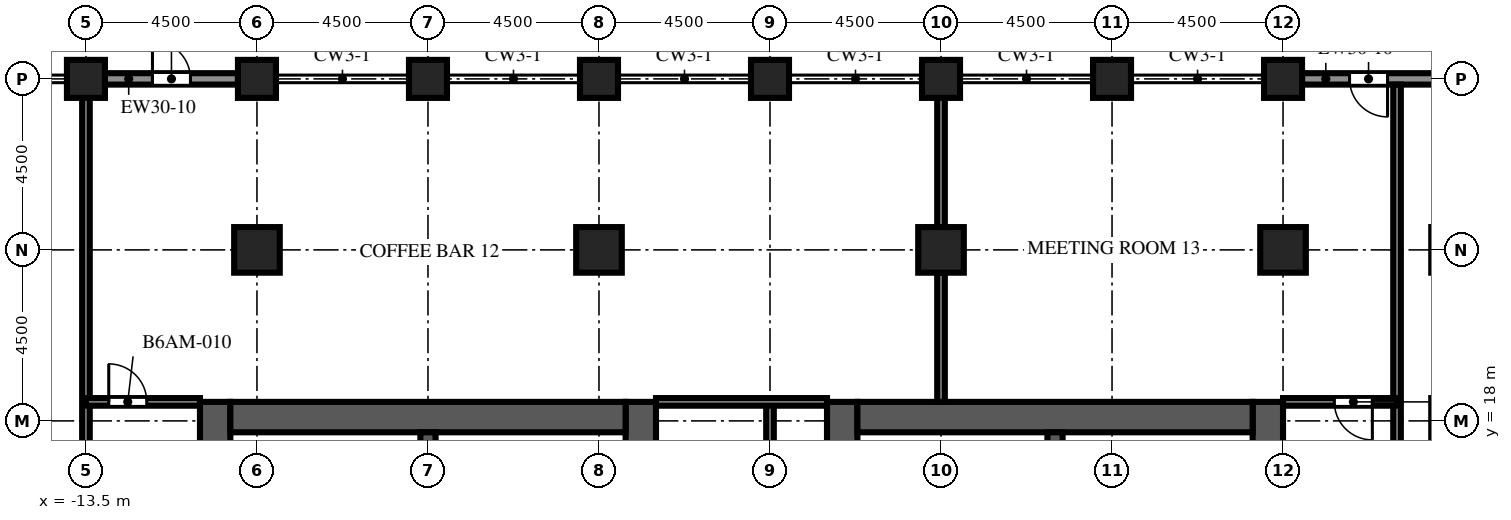
"""IFC4 building model, lengths in metres.
Left out: names, types, materials, properties, quantities, classifications, styles, units other than length and angle.
Written with IfcOpenShell. Run it as: python <this file> out.ifc"""

import sys

from ifc_helpers import new_model, si_unit, direction, frame, frame_2d, origin, origin_2d, place, context, subcontext, project, spatial, rectangle, extrude, element, fill, save


model = new_model("IFC4")
c1 = context("Model", 3, precision=1e-05, world=origin(), true_north=direction((0.0, 1.0)))
c2 = subcontext(c1, "Body", "Model", "MODEL_VIEW")
j1 = project(units=[si_unit("LENGTHUNIT", "METRE"), si_unit("PLANEANGLEUNIT", "RADIAN")], contexts=[c1])
p1 = place(None, origin())
s1 = spatial("IfcSite", under=j1, at=p1, CompositionType="ELEMENT")
p2 = place(p1, origin())
s2 = spatial("IfcBuilding", under=s1, at=p2, CompositionType="ELEMENT")
p3 = place(p2, frame((0.0, 0.0, 220.2)))
s3 = spatial("IfcBuildingStorey", under=s2, at=p3, CompositionType="ELEMENT", Elevation=220.2)
for number, where, z_axis, x_axis in (
    (1, (-13.5, 27.0, 0.0), (0.0, 0.0, 1.0), (1.0, 0.0, 0.0)),
    (2, (-9.0, 27.0, 0.0), (0.0, 0.0, 1.0), (1.0, 0.0, 0.0)),
    (3, (-4.5, 27.0, 0.0), (0.0, 0.0, 1.0), (1.0, 0.0, 0.0)),
    (4, (0.0, 27.0, 0.0), (0.0, 0.0, 1.0), (1.0, 0.0, 0.0)),
    (5, (4.5, 27.0, 0.0), (0.0, 0.0, 1.0), (1.0, 0.0, 0.0)),
    (6, (9.0, 27.0, 0.0), (0.0, 0.0, 1.0), (1.0, 0.0, 0.0)),
    (7, (13.5, 27.0, 0.0), (0.0, 0.0, 1.0), (1.0, 0.0, 0.0)),
    (8, (18.0, 27.0, 0.0), (0.0, 0.0, 1.0), (1.0, 0.0, 0.0)),
):
    element("IfcColumn", number, at=place(p3, frame(where, z_axis=z_axis, x_axis=x_axis)), inside=s3, PredefinedType="COLUMN", context=c2, shape_type="SweptSolid", body=[
        extrude(rectangle(XDim=1.0, YDim=1.0, at=origin_2d()), origin(), (0.0, 0.0, 1.0), 6.0),
    ])
for number, where, z_axis, x_axis in (
    (9, (-9.0, 22.5, 0.0), (0.0, 0.0, 1.0), (1.0, 0.0, 0.0)),
    (10, (0.0, 22.5, 0.0), (0.0, 0.0, 1.0), (1.0, 0.0, 0.0)),
    (11, (9.0, 22.5, 0.0), (0.0, 0.0, 1.0), (1.0, 0.0, 0.0)),
    (12, (18.0, 22.5, 0.0), (0.0, 0.0, 1.0), (1.0, 0.0, 0.0)),
):
    element("IfcColumn", number, at=place(p3, frame(where, z_axis=z_axis, x_axis=x_axis)), inside=s3, PredefinedType="COLUMN", context=c2, shape_type="SweptSolid", body=[
        extrude(rectangle(XDim=1.2, YDim=1.2, at=origin_2d()), origin(), (0.0, 0.0, 1.0), 6.0),
    ])
p4 = place(p3, frame((-10.1, -9.0, 0.0), z_axis=(0.0, 0.0, 1.0), x_axis=(0.0, 1.0, 0.0)))
e13 = element("IfcWall", 13, at=p4, inside=s3, PredefinedType="SHEAR", context=c2, shape_type="SweptSolid", body=[
    extrude(rectangle(XDim=27.5, YDim=0.8, at=frame_2d((13.75, 0.0))), origin(), (0.0, 0.0, 1.0), 6.0),
])
p5 = place(p4, frame((12.55, 0.0, 0.0)))
e14 = element("IfcOpeningElement", 14, at=p5, cuts=e13, PredefinedType="OPENING", context=c2, shape_type="SweptSolid", body=[
    extrude(rectangle(XDim=2.4, YDim=2.4, at=frame_2d((1.2, 1.2))), frame((0.0, 0.41, 0.0), z_axis=(0.0, -1.0, 0.0), x_axis=(1.0, 0.0, 0.0)), (0.0, 0.0, 1.0), 0.82),
])
p6 = place(p4, frame((6.825, 0.0, 0.0)))
e15 = element("IfcOpeningElement", 15, at=p6, cuts=e13, PredefinedType="OPENING", context=c2, shape_type="SweptSolid", body=[
    extrude(rectangle(XDim=1.2, YDim=2.1, at=frame_2d((0.6, 1.05))), frame((0.0, 0.41, 0.0), z_axis=(0.0, -1.0, 0.0), x_axis=(1.0, 0.0, 0.0)), (0.0, 0.0, 1.0), 0.82),
])
p7 = place(p4, frame((19.475, 0.0, 0.0)))
e16 = element("IfcOpeningElement", 16, at=p7, cuts=e13, PredefinedType="OPENING", context=c2, shape_type="SweptSolid", body=[
    extrude(rectangle(XDim=1.2, YDim=2.1, at=frame_2d((0.6, 1.05))), frame((0.0, 0.41, 0.0), z_axis=(0.0, -1.0, 0.0), x_axis=(1.0, 0.0, 0.0)), (0.0, 0.0, 1.0), 0.82),
])
p8 = place(p3, frame((1.1, -9.0, 0.0), z_axis=(0.0, 0.0, 1.0), x_axis=(0.0, 1.0, 0.0)))
e17 = element("IfcWall", 17, at=p8, inside=s3, PredefinedType="SHEAR", context=c2, shape_type="SweptSolid", body=[
    extrude(rectangle(XDim=27.5, YDim=0.8, at=frame_2d((13.75, 0.0))), origin(), (0.0, 0.0, 1.0), 6.0),
])
p9 = place(p8, frame((12.55, 0.0, 0.0)))
e18 = element("IfcOpeningElement", 18, at=p9, cuts=e17, PredefinedType="OPENING", context=c2, shape_type="SweptSolid", body=[
    extrude(rectangle(XDim=2.4, YDim=2.4, at=frame_2d((1.2, 1.2))), frame((0.0, 0.41, 0.0), z_axis=(0.0, -1.0, 0.0), x_axis=(1.0, 0.0, 0.0)), (0.0, 0.0, 1.0), 0.82),
])
p10 = place(p8, frame((5.5, 0.0, 0.0)))
e19 = element("IfcOpeningElement", 19, at=p10, cuts=e17, PredefinedType="OPENING", context=c2, shape_type="SweptSolid", body=[
    extrude(rectangle(XDim=0.95, YDim=2.1, at=frame_2d((0.475, 1.05))), frame((0.0, 0.41, 0.0), z_axis=(0.0, -1.0, 0.0), x_axis=(1.0, 0.0, 0.0)), (0.0, 0.0, 1.0), 0.82),
])
p11 = place(p8, frame((23.475, 0.0, 0.0)))
e20 = element("IfcOpeningElement", 20, at=p11, cuts=e17, PredefinedType="OPENING", context=c2, shape_type="SweptSolid", body=[
    extrude(rectangle(XDim=1.2, YDim=2.1, at=frame_2d((0.6, 1.05))), frame((0.0, 0.41, 0.0), z_axis=(0.0, -1.0, 0.0), x_axis=(1.0, 0.0, 0.0)), (0.0, 0.0, 1.0), 0.82),
])
p12 = place(p3, frame((-9.7, 18.1, 0.0), z_axis=(0.0, 0.0, 1.0), x_axis=(1.0, 0.0, 0.0)))
e21 = element("IfcWall", 21, at=p12, inside=s3, PredefinedType="SHEAR", context=c2, shape_type="SweptSolid", body=[
    extrude(rectangle(XDim=10.4, YDim=0.8, at=frame_2d((5.2, 0.0))), origin(), (0.0, 0.0, 1.0), 6.0),
])
p13 = place(p3, frame((-4.5, 10.2, 0.0), z_axis=(0.0, 0.0, 1.0), x_axis=(0.0, 1.0, 0.0)))
e22 = element("IfcWall", 22, at=p13, inside=s3, PredefinedType="SHEAR", context=c2, shape_type="SweptSolid", body=[
    extrude(rectangle(XDim=7.5, YDim=0.4, at=frame_2d((3.75, 0.0))), origin(), (0.0, 0.0, 1.0), 6.0),
])
p14 = place(p3, frame((6.4, -9.0, 0.0), z_axis=(0.0, 0.0, 1.0), x_axis=(0.0, 1.0, 0.0)))
e23 = element("IfcWall", 23, at=p14, inside=s3, PredefinedType="SHEAR", context=c2, shape_type="SweptSolid", body=[
    extrude(rectangle(XDim=27.5, YDim=0.8, at=frame_2d((13.75, 0.0))), origin(), (0.0, 0.0, 1.0), 6.0),
])
p15 = place(p14, frame((12.55, 0.0, 0.0)))
e24 = element("IfcOpeningElement", 24, at=p15, cuts=e23, PredefinedType="OPENING", context=c2, shape_type="SweptSolid", body=[
    extrude(rectangle(XDim=2.4, YDim=2.4, at=frame_2d((1.2, 1.2))), frame((0.0, 0.41, 0.0), z_axis=(0.0, -1.0, 0.0), x_axis=(1.0, 0.0, 0.0)), (0.0, 0.0, 1.0), 0.82),
])
p16 = place(p14, frame((5.5, 0.0, 0.0)))
e25 = element("IfcOpeningElement", 25, at=p16, cuts=e23, PredefinedType="OPENING", context=c2, shape_type="SweptSolid", body=[
    extrude(rectangle(XDim=0.95, YDim=2.1, at=frame_2d((0.475, 1.05))), frame((0.0, 0.41, 0.0), z_axis=(0.0, -1.0, 0.0), x_axis=(1.0, 0.0, 0.0)), (0.0, 0.0, 1.0), 0.82),
])
p17 = place(p14, frame((23.475, 0.0, 0.0)))
e26 = element("IfcOpeningElement", 26, at=p17, cuts=e23, PredefinedType="OPENING", context=c2, shape_type="SweptSolid", body=[
    extrude(rectangle(XDim=1.2, YDim=2.1, at=frame_2d((0.6, 1.05))), frame((0.0, 0.41, 0.0), z_axis=(0.0, -1.0, 0.0), x_axis=(1.0, 0.0, 0.0)), (0.0, 0.0, 1.0), 0.82),
])
p18 = place(p3, frame((17.6, -9.0, 0.0), z_axis=(0.0, 0.0, 1.0), x_axis=(0.0, 1.0, 0.0)))
e27 = element("IfcWall", 27, at=p18, inside=s3, PredefinedType="SHEAR", context=c2, shape_type="SweptSolid", body=[
    extrude(rectangle(XDim=27.5, YDim=0.8, at=frame_2d((13.75, 0.0))), origin(), (0.0, 0.0, 1.0), 6.0),
])
p19 = place(p18, frame((12.55, 0.0, 0.0)))
e28 = element("IfcOpeningElement", 28, at=p19, cuts=e27, PredefinedType="OPENING", context=c2, shape_type="SweptSolid", body=[
    extrude(rectangle(XDim=2.4, YDim=2.4, at=frame_2d((1.2, 1.2))), frame((0.0, 0.41, 0.0), z_axis=(0.0, -1.0, 0.0), x_axis=(1.0, 0.0, 0.0)), (0.0, 0.0, 1.0), 0.82),
])
p20 = place(p18, frame((6.825, 0.0, 0.0)))
e29 = element("IfcOpeningElement", 29, at=p20, cuts=e27, PredefinedType="OPENING", context=c2, shape_type="SweptSolid", body=[
    extrude(rectangle(XDim=1.2, YDim=2.1, at=frame_2d((0.6, 1.05))), frame((0.0, 0.41, 0.0), z_axis=(0.0, -1.0, 0.0), x_axis=(1.0, 0.0, 0.0)), (0.0, 0.0, 1.0), 0.82),
])
p21 = place(p18, frame((19.475, 0.0, 0.0)))
e30 = element("IfcOpeningElement", 30, at=p21, cuts=e27, PredefinedType="OPENING", context=c2, shape_type="SweptSolid", body=[
    extrude(rectangle(XDim=1.2, YDim=2.1, at=frame_2d((0.6, 1.05))), frame((0.0, 0.41, 0.0), z_axis=(0.0, -1.0, 0.0), x_axis=(1.0, 0.0, 0.0)), (0.0, 0.0, 1.0), 0.82),
])
p22 = place(p3, frame((6.8, 18.1, 0.0), z_axis=(0.0, 0.0, 1.0), x_axis=(1.0, 0.0, 0.0)))
e31 = element("IfcWall", 31, at=p22, inside=s3, PredefinedType="SHEAR", context=c2, shape_type="SweptSolid", body=[
    extrude(rectangle(XDim=10.4, YDim=0.8, at=frame_2d((5.2, 0.0))), origin(), (0.0, 0.0, 1.0), 6.0),
])
p23 = place(p3, frame((12.0, 10.2, 0.0), z_axis=(0.0, 0.0, 1.0), x_axis=(0.0, 1.0, 0.0)))
e32 = element("IfcWall", 32, at=p23, inside=s3, PredefinedType="SHEAR", context=c2, shape_type="SweptSolid", body=[
    extrude(rectangle(XDim=7.5, YDim=0.4, at=frame_2d((3.75, 0.0))), origin(), (0.0, 0.0, 1.0), 6.0),
])
p24 = place(p3, frame((18.5, 27.0, 0.0), z_axis=(0.0, 0.0, 1.0), x_axis=(1.0, 0.0, 0.0)))
e33 = element("IfcWall", 33, at=p24, inside=s3, PredefinedType="SOLIDWALL", context=c2, shape_type="SweptSolid", body=[
    extrude(rectangle(XDim=3.5, YDim=0.3, at=frame_2d((1.75, 0.0))), origin(), (0.0, 0.0, 1.0), 4.6),
])
p25 = place(p24, frame((1.25, 0.0, 0.0)))
e34 = element("IfcOpeningElement", 34, at=p25, cuts=e33, PredefinedType="OPENING", context=c2, shape_type="SweptSolid", body=[
    extrude(rectangle(XDim=1.0, YDim=2.2, at=frame_2d((0.5, 1.1))), frame((0.0, 0.16, 0.0), z_axis=(0.0, -1.0, 0.0), x_axis=(1.0, 0.0, 0.0)), (0.0, 0.0, 1.0), 0.32),
])
p26 = place(p3, frame((-13.0, 27.0, 0.0), z_axis=(0.0, 0.0, 1.0), x_axis=(1.0, 0.0, 0.0)))
e35 = element("IfcWall", 35, at=p26, inside=s3, PredefinedType="SOLIDWALL", context=c2, shape_type="SweptSolid", body=[
    extrude(rectangle(XDim=3.5, YDim=0.3, at=frame_2d((1.75, 0.0))), origin(), (0.0, 0.0, 1.0), 4.6),
])
p27 = place(p26, frame((1.25, 0.0, 0.0)))
e36 = element("IfcOpeningElement", 36, at=p27, cuts=e35, PredefinedType="OPENING", context=c2, shape_type="SweptSolid", body=[
    extrude(rectangle(XDim=1.0, YDim=2.2, at=frame_2d((0.5, 1.1))), frame((0.0, 0.16, 0.0), z_axis=(0.0, -1.0, 0.0), x_axis=(1.0, 0.0, 0.0)), (0.0, 0.0, 1.0), 0.32),
])
p28 = place(p3, frame((-0.6, 15.075, 0.0), z_axis=(0.0, 0.0, 1.0), x_axis=(0.0, 1.0, 0.0)))
e37 = element("IfcWall", 37, at=p28, inside=s3, PredefinedType="PARTITIONING", context=c2, shape_type="SweptSolid", body=[
    extrude(rectangle(XDim=2.625, YDim=0.1, at=frame_2d((1.312, 0.0))), origin(), (0.0, 0.0, 1.0), 5.4),
])
p29 = place(p28, frame((0.812, 0.0, 0.0)))
e38 = element("IfcOpeningElement", 38, at=p29, cuts=e37, PredefinedType="OPENING", context=c2, shape_type="SweptSolid", body=[
    extrude(rectangle(XDim=1.0, YDim=2.1, at=frame_2d((0.5, 1.05))), frame((0.0, 0.06, 0.0), z_axis=(0.0, -1.0, 0.0), x_axis=(1.0, 0.0, 0.0)), (0.0, 0.0, 1.0), 0.12),
])
p30 = place(p3, frame((8.1, 15.075, 0.0), z_axis=(0.0, 0.0, 1.0), x_axis=(0.0, 1.0, 0.0)))
e39 = element("IfcWall", 39, at=p30, inside=s3, PredefinedType="PARTITIONING", context=c2, shape_type="SweptSolid", body=[
    extrude(rectangle(XDim=2.625, YDim=0.1, at=frame_2d((1.312, 0.0))), origin(), (0.0, 0.0, 1.0), 5.4),
])
p31 = place(p30, frame((0.812, 0.0, 0.0)))
e40 = element("IfcOpeningElement", 40, at=p31, cuts=e39, PredefinedType="OPENING", context=c2, shape_type="SweptSolid", body=[
    extrude(rectangle(XDim=1.0, YDim=2.1, at=frame_2d((0.5, 1.05))), frame((0.0, 0.06, 0.0), z_axis=(0.0, -1.0, 0.0), x_axis=(1.0, 0.0, 0.0)), (0.0, 0.0, 1.0), 0.12),
])
p32 = place(p3, frame((-13.5, 6.25, 0.0), z_axis=(0.0, 0.0, 1.0), x_axis=(0.0, 1.0, 0.0)))
e41 = element("IfcWall", 41, at=p32, inside=s3, PredefinedType="PARTITIONING", context=c2, shape_type="SweptSolid", body=[
    extrude(rectangle(XDim=20.25, YDim=0.2, at=frame_2d((10.125, 0.0))), origin(), (0.0, 0.0, 1.0), 5.4),
])
p33 = place(p32, frame((6.1, 0.0, 0.0)))
e42 = element("IfcOpeningElement", 42, at=p33, cuts=e41, PredefinedType="OPENING", context=c2, shape_type="SweptSolid", body=[
    extrude(rectangle(XDim=1.0, YDim=2.1, at=frame_2d((0.5, 1.05))), frame((0.0, 0.11, 0.0), z_axis=(0.0, -1.0, 0.0), x_axis=(1.0, 0.0, 0.0)), (0.0, 0.0, 1.0), 0.22),
])
p34 = place(p3, frame((4.5, 18.5, 0.0), z_axis=(0.0, 0.0, 1.0), x_axis=(0.0, -1.0, 0.0)))
e43 = element("IfcWall", 43, at=p34, inside=s3, PredefinedType="PARTITIONING", context=c2, shape_type="SweptSolid", body=[
    extrude(rectangle(XDim=11.8, YDim=0.2, at=frame_2d((5.9, 0.0))), origin(), (0.0, 0.0, 1.0), 5.4),
])
p35 = place(p34, frame((5.95, 0.0, 0.0)))
e44 = element("IfcOpeningElement", 44, at=p35, cuts=e43, PredefinedType="OPENING", context=c2, shape_type="SweptSolid", body=[
    extrude(rectangle(XDim=1.0, YDim=2.1, at=frame_2d((0.5, 1.05))), frame((0.0, 0.11, 0.0), z_axis=(0.0, -1.0, 0.0), x_axis=(1.0, 0.0, 0.0)), (0.0, 0.0, 1.0), 0.22),
])
for number, where, z_axis, x_axis in (
    (45, (9.0, 18.5, 0.0), (0.0, 0.0, 1.0), (0.0, 1.0, 0.0)),
    (46, (9.0, 23.1, 0.0), (0.0, 0.0, 1.0), (0.0, 1.0, 0.0)),
):
    element("IfcWall", number, at=place(p3, frame(where, z_axis=z_axis, x_axis=x_axis)), inside=s3, PredefinedType="PARTITIONING", context=c2, shape_type="SweptSolid", body=[
        extrude(rectangle(XDim=3.4, YDim=0.2, at=frame_2d((1.7, 0.0))), origin(), (0.0, 0.0, 1.0), 5.4),
    ])
p36 = place(p3, frame((21.0, 26.85, 0.0), z_axis=(0.0, 0.0, 1.0), x_axis=(0.0, -1.0, 0.0)))
e47 = element("IfcWall", 47, at=p36, inside=s3, PredefinedType="PARTITIONING", context=c2, shape_type="SweptSolid", body=[
    extrude(rectangle(XDim=20.6, YDim=0.2, at=frame_2d((10.3, 0.0))), origin(), (0.0, 0.0, 1.0), 5.4),
])
p37 = place(p36, frame((13.25, 0.0, 0.0)))
e48 = element("IfcOpeningElement", 48, at=p37, cuts=e47, PredefinedType="OPENING", context=c2, shape_type="SweptSolid", body=[
    extrude(rectangle(XDim=1.0, YDim=2.1, at=frame_2d((0.5, 1.05))), frame((0.0, 0.11, 0.0), z_axis=(0.0, -1.0, 0.0), x_axis=(1.0, 0.0, 0.0)), (0.0, 0.0, 1.0), 0.22),
])
p38 = place(p3, frame((-13.5, 18.5, 0.0), z_axis=(0.0, 0.0, 1.0), x_axis=(1.0, 0.0, 0.0)))
e49 = element("IfcWall", 49, at=p38, inside=s3, PredefinedType="PARTITIONING", context=c2, shape_type="SweptSolid", body=[
    extrude(rectangle(XDim=3.0, YDim=0.2, at=frame_2d((1.5, 0.0))), origin(), (0.0, 0.0, 1.0), 5.4),
])
p39 = place(p38, frame((0.6, 0.0, 0.0)))
e50 = element("IfcOpeningElement", 50, at=p39, cuts=e49, PredefinedType="OPENING", context=c2, shape_type="SweptSolid", body=[
    extrude(rectangle(XDim=1.0, YDim=2.1, at=frame_2d((0.5, 1.05))), frame((0.0, 0.11, 0.0), z_axis=(0.0, -1.0, 0.0), x_axis=(1.0, 0.0, 0.0)), (0.0, 0.0, 1.0), 0.22),
])
p40 = place(p3, frame((1.5, 18.5, 0.0), z_axis=(0.0, 0.0, 1.0), x_axis=(1.0, 0.0, 0.0)))
e51 = element("IfcWall", 51, at=p40, inside=s3, PredefinedType="PARTITIONING", context=c2, shape_type="SweptSolid", body=[
    extrude(rectangle(XDim=4.5, YDim=0.2, at=frame_2d((2.25, 0.0))), origin(), (0.0, 0.0, 1.0), 5.4),
])
p41 = place(p3, frame((18.0, 18.5, 0.0), z_axis=(0.0, 0.0, 1.0), x_axis=(1.0, 0.0, 0.0)))
e52 = element("IfcWall", 52, at=p41, inside=s3, PredefinedType="PARTITIONING", context=c2, shape_type="SweptSolid", body=[
    extrude(rectangle(XDim=3.0, YDim=0.2, at=frame_2d((1.5, 0.0))), origin(), (0.0, 0.0, 1.0), 5.4),
])
p42 = place(p41, frame((1.35, 0.0, 0.0)))
e53 = element("IfcOpeningElement", 53, at=p42, cuts=e52, PredefinedType="OPENING", context=c2, shape_type="SweptSolid", body=[
    extrude(rectangle(XDim=1.0, YDim=2.1, at=frame_2d((0.5, 1.05))), frame((0.0, 0.11, 0.0), z_axis=(0.0, -1.0, 0.0), x_axis=(1.0, 0.0, 0.0)), (0.0, 0.0, 1.0), 0.22),
])
p43 = place(p25, origin())
e54 = element("IfcDoor", 54, at=p43, inside=s3, OperationType="SINGLE_SWING_RIGHT", PredefinedType="DOOR", context=c2, shape_type="SweptSolid", body=[
    extrude(rectangle(XDim=1.0, YDim=2.2, at=frame_2d((0.5, 1.1))), frame((0.0, 0.025, 0.0), z_axis=(0.0, -1.0, 0.0), x_axis=(1.0, 0.0, 0.0)), (0.0, 0.0, 1.0), 0.05),
])
fill(e34, e54)
p44 = place(p27, origin())
e55 = element("IfcDoor", 55, at=p44, inside=s3, OperationType="SINGLE_SWING_LEFT", PredefinedType="DOOR", context=c2, shape_type="SweptSolid", body=[
    extrude(rectangle(XDim=1.0, YDim=2.2, at=frame_2d((0.5, 1.1))), frame((0.0, 0.025, 0.0), z_axis=(0.0, -1.0, 0.0), x_axis=(1.0, 0.0, 0.0)), (0.0, 0.0, 1.0), 0.05),
])
fill(e36, e55)
p45 = place(p39, origin())
e56 = element("IfcDoor", 56, at=p45, inside=s3, OperationType="SINGLE_SWING_LEFT", PredefinedType="DOOR", context=c2, shape_type="SweptSolid", body=[
    extrude(rectangle(XDim=1.0, YDim=2.1, at=frame_2d((0.5, 1.05))), frame((0.0, 0.025, 0.0), z_axis=(0.0, -1.0, 0.0), x_axis=(1.0, 0.0, 0.0)), (0.0, 0.0, 1.0), 0.05),
])
fill(e50, e56)
p46 = place(p42, origin())
e57 = element("IfcDoor", 57, at=p46, inside=s3, OperationType="SINGLE_SWING_RIGHT", PredefinedType="DOOR", context=c2, shape_type="SweptSolid", body=[
    extrude(rectangle(XDim=1.0, YDim=2.1, at=frame_2d((0.5, 1.05))), frame((0.0, 0.025, 0.0), z_axis=(0.0, -1.0, 0.0), x_axis=(1.0, 0.0, 0.0)), (0.0, 0.0, 1.0), 0.05),
])
fill(e53, e57)
save(model, sys.argv[1])
